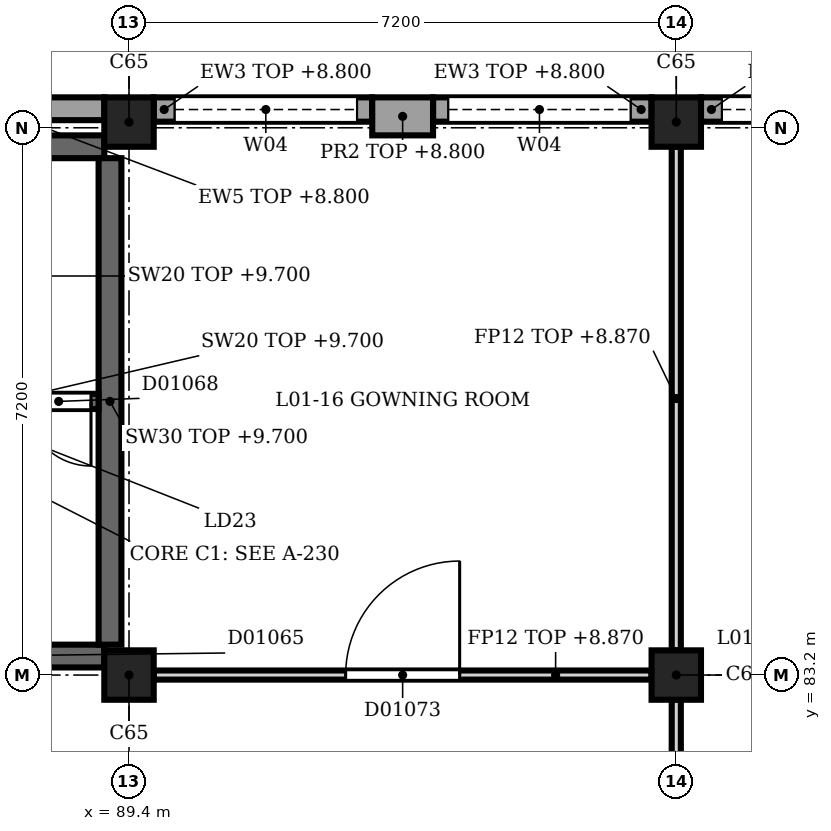
"""IFC4 building model, lengths in metres.
Left out: names, types, materials, properties, quantities, classifications, styles, units other than length and angle.
Written with IfcOpenShell. Run it as: python <this file> out.ifc"""

import sys

from ifc_helpers import new_model, si_unit, direction, frame, frame_2d, origin, origin_2d, place, context, subcontext, project, spatial, rectangle, extrude, element, fill, save


model = new_model("IFC4")
c1 = context("Model", 3, precision=1e-05, world=origin(), true_north=direction((0.0, 1.0)))
c2 = subcontext(c1, "Body", "Model", "MODEL_VIEW")
j1 = project(units=[si_unit("LENGTHUNIT", "METRE"), si_unit("PLANEANGLEUNIT", "RADIAN")], contexts=[c1])
p1 = place(None, origin())
s1 = spatial("IfcSite", under=j1, at=p1, CompositionType="ELEMENT")
p2 = place(p1, origin())
s2 = spatial("IfcBuilding", under=s1, at=p2, CompositionType="ELEMENT")
p3 = place(p2, frame((0.0, 0.0, 5.4)))
s3 = spatial("IfcBuildingStorey", under=s2, at=p3, CompositionType="ELEMENT", Elevation=5.4)
for number, where, z_axis, x_axis in (
    (1, (89.4, 83.2, 0.0), (0.0, 0.0, 1.0), (1.0, 0.0, 0.0)),
    (2, (89.4, 90.475, 0.0), (0.0, 0.0, 1.0), (1.0, 0.0, 0.0)),
    (3, (96.6, 83.2, 0.0), (0.0, 0.0, 1.0), (1.0, 0.0, 0.0)),
    (4, (96.6, 90.475, 0.0), (0.0, 0.0, 1.0), (1.0, 0.0, 0.0)),
):
    element("IfcColumn", number, at=place(p3, frame(where, z_axis=z_axis, x_axis=x_axis)), inside=s3, PredefinedType="COLUMN", context=c2, shape_type="SweptSolid", body=[
        extrude(rectangle(XDim=0.65, YDim=0.65, at=origin_2d()), origin(), (0.0, 0.0, 1.0), 4.5),
    ])
p4 = place(p3, frame((92.6, 90.55, 0.0), z_axis=(0.0, 0.0, 1.0), x_axis=(1.0, 0.0, 0.0)))
e5 = element("IfcWall", 5, at=p4, inside=s3, PredefinedType="SOLIDWALL", context=c2, shape_type="SweptSolid", body=[
    extrude(rectangle(XDim=0.8, YDim=0.5, at=frame_2d((0.4, 0.0))), origin(), (0.0, 0.0, 1.0), 3.4),
])
p5 = place(p3, frame((86.2, 90.65, 0.0), z_axis=(0.0, 0.0, 1.0), x_axis=(1.0, 0.0, 0.0)))
e6 = element("IfcWall", 6, at=p5, inside=s3, PredefinedType="SOLIDWALL", context=c2, shape_type="SweptSolid", body=[
    extrude(rectangle(XDim=2.875, YDim=0.3, at=frame_2d((1.438, 0.0))), origin(), (0.0, 0.0, 1.0), 3.4),
])
p6 = place(p3, frame((89.725, 90.64, 0.0), z_axis=(0.0, 0.0, 1.0), x_axis=(1.0, 0.0, 0.0)))
e7 = element("IfcWall", 7, at=p6, inside=s3, PredefinedType="SOLIDWALL", context=c2, shape_type="SweptSolid", body=[
    extrude(rectangle(XDim=2.875, YDim=0.32, at=frame_2d((1.438, 0.0))), origin(), (0.0, 0.0, 1.0), 3.4),
])
p7 = place(p6, frame((0.275, 0.0, 1.9)))
e8 = element("IfcOpeningElement", 8, at=p7, cuts=e7, PredefinedType="OPENING", context=c2, shape_type="SweptSolid", body=[
    extrude(rectangle(XDim=2.4, YDim=1.2, at=frame_2d((1.2, 0.6))), frame((0.0, 0.17, 0.0), z_axis=(0.0, -1.0, 0.0), x_axis=(1.0, 0.0, 0.0)), (0.0, 0.0, 1.0), 0.34),
])
p8 = place(p3, frame((93.4, 90.64, 0.0), z_axis=(0.0, 0.0, 1.0), x_axis=(1.0, 0.0, 0.0)))
e9 = element("IfcWall", 9, at=p8, inside=s3, PredefinedType="SOLIDWALL", context=c2, shape_type="SweptSolid", body=[
    extrude(rectangle(XDim=2.875, YDim=0.32, at=frame_2d((1.438, 0.0))), origin(), (0.0, 0.0, 1.0), 3.4),
])
p9 = place(p8, frame((0.2, 0.0, 1.9)))
e10 = element("IfcOpeningElement", 10, at=p9, cuts=e9, PredefinedType="OPENING", context=c2, shape_type="SweptSolid", body=[
    extrude(rectangle(XDim=2.4, YDim=1.2, at=frame_2d((1.2, 0.6))), frame((0.0, 0.17, 0.0), z_axis=(0.0, -1.0, 0.0), x_axis=(1.0, 0.0, 0.0)), (0.0, 0.0, 1.0), 0.34),
])
p10 = place(p3, frame((96.925, 90.64, 0.0), z_axis=(0.0, 0.0, 1.0), x_axis=(1.0, 0.0, 0.0)))
e11 = element("IfcWall", 11, at=p10, inside=s3, PredefinedType="SOLIDWALL", context=c2, shape_type="SweptSolid", body=[
    extrude(rectangle(XDim=2.875, YDim=0.32, at=frame_2d((1.438, 0.0))), origin(), (0.0, 0.0, 1.0), 3.4),
])
p11 = place(p10, frame((0.275, 0.0, 1.9)))
e12 = element("IfcOpeningElement", 12, at=p11, cuts=e11, PredefinedType="OPENING", context=c2, shape_type="SweptSolid", body=[
    extrude(rectangle(XDim=2.4, YDim=1.2, at=frame_2d((1.2, 0.6))), frame((0.0, 0.17, 0.0), z_axis=(0.0, -1.0, 0.0), x_axis=(1.0, 0.0, 0.0)), (0.0, 0.0, 1.0), 0.34),
])
p12 = place(p3, frame((82.55, 83.45, 0.0), z_axis=(0.0, 0.0, 1.0), x_axis=(1.0, 0.0, 0.0)))
e13 = element("IfcWall", 13, at=p12, inside=s3, PredefinedType="SHEAR", context=c2, shape_type="SweptSolid", body=[
    extrude(rectangle(XDim=6.525, YDim=0.3, at=frame_2d((3.262, 0.0))), origin(), (0.0, 0.0, 1.0), 4.3),
])
p13 = place(p12, frame((4.25, 0.0, 0.0)))
e14 = element("IfcOpeningElement", 14, at=p13, cuts=e13, PredefinedType="OPENING", context=c2, shape_type="SweptSolid", body=[
    extrude(rectangle(XDim=1.2, YDim=2.1, at=frame_2d((0.6, 1.05))), frame((0.0, 0.16, 0.0), z_axis=(0.0, -1.0, 0.0), x_axis=(1.0, 0.0, 0.0)), (0.0, 0.0, 1.0), 0.32),
])
p14 = place(p3, frame((82.55, 90.15, 0.0), z_axis=(0.0, 0.0, 1.0), x_axis=(1.0, 0.0, 0.0)))
e15 = element("IfcWall", 15, at=p14, inside=s3, PredefinedType="SHEAR", context=c2, shape_type="SweptSolid", body=[
    extrude(rectangle(XDim=6.525, YDim=0.3, at=frame_2d((3.262, 0.0))), origin(), (0.0, 0.0, 1.0), 4.3),
])
p15 = place(p14, frame((1.15, 0.0, 1.2)))
e16 = element("IfcOpeningElement", 16, at=p15, cuts=e15, PredefinedType="OPENING", context=c2, shape_type="SweptSolid", body=[
    extrude(rectangle(XDim=0.6, YDim=1.8, at=frame_2d((0.3, 0.9))), frame((0.0, 0.16, 0.0), z_axis=(0.0, -1.0, 0.0), x_axis=(1.0, 0.0, 0.0)), (0.0, 0.0, 1.0), 0.32),
])
p16 = place(p3, frame((89.15, 83.6, 0.0), z_axis=(0.0, 0.0, 1.0), x_axis=(0.0, 1.0, 0.0)))
e17 = element("IfcWall", 17, at=p16, inside=s3, PredefinedType="SHEAR", context=c2, shape_type="SweptSolid", body=[
    extrude(rectangle(XDim=6.4, YDim=0.3, at=frame_2d((3.2, 0.0))), origin(), (0.0, 0.0, 1.0), 4.3),
])
p17 = place(p3, frame((89.0, 86.8, 0.0), z_axis=(0.0, 0.0, 1.0), x_axis=(-1.0, 0.0, 0.0)))
e18 = element("IfcWall", 18, at=p17, inside=s3, PredefinedType="SHEAR", context=c2, shape_type="SweptSolid", body=[
    extrude(rectangle(XDim=3.25, YDim=0.2, at=frame_2d((1.625, 0.0))), origin(), (0.0, 0.0, 1.0), 4.3),
])
p18 = place(p17, frame((1.55, 0.0, 0.0)))
e19 = element("IfcOpeningElement", 19, at=p18, cuts=e18, PredefinedType="OPENING", context=c2, shape_type="SweptSolid", body=[
    extrude(rectangle(XDim=1.4, YDim=2.1, at=frame_2d((0.7, 1.05))), frame((0.0, 0.11, 0.0), z_axis=(0.0, -1.0, 0.0), x_axis=(1.0, 0.0, 0.0)), (0.0, 0.0, 1.0), 0.22),
])
p19 = place(p17, frame((0.1, 0.0, 0.0)))
e20 = element("IfcOpeningElement", 20, at=p19, cuts=e18, PredefinedType="OPENING", context=c2, shape_type="SweptSolid", body=[
    extrude(rectangle(XDim=0.85, YDim=2.1, at=frame_2d((0.425, 1.05))), frame((0.0, 0.11, 0.0), z_axis=(0.0, -1.0, 0.0), x_axis=(1.0, 0.0, 0.0)), (0.0, 0.0, 1.0), 0.22),
])
p20 = place(p3, frame((89.725, 83.2, 0.0), z_axis=(0.0, 0.0, 1.0), x_axis=(1.0, 0.0, 0.0)))
e21 = element("IfcWall", 21, at=p20, inside=s3, PredefinedType="PARTITIONING", context=c2, shape_type="SweptSolid", body=[
    extrude(rectangle(XDim=6.55, YDim=0.12, at=frame_2d((3.275, 0.0))), origin(), (0.0, 0.0, 1.0), 3.47),
])
p21 = place(p20, frame((2.525, 0.0, 0.0)))
e22 = element("IfcOpeningElement", 22, at=p21, cuts=e21, PredefinedType="OPENING", context=c2, shape_type="SweptSolid", body=[
    extrude(rectangle(XDim=1.5, YDim=2.1, at=frame_2d((0.75, 1.05))), frame((0.0, 0.07, 0.0), z_axis=(0.0, -1.0, 0.0), x_axis=(1.0, 0.0, 0.0)), (0.0, 0.0, 1.0), 0.14),
])
p22 = place(p3, frame((96.6, 82.875, 0.0), z_axis=(0.0, 0.0, 1.0), x_axis=(0.0, -1.0, 0.0)))
e23 = element("IfcWall", 23, at=p22, inside=s3, PredefinedType="PARTITIONING", context=c2, shape_type="SweptSolid", body=[
    extrude(rectangle(XDim=6.55, YDim=0.12, at=frame_2d((3.275, 0.0))), origin(), (0.0, 0.0, 1.0), 3.47),
])
p23 = place(p22, frame((2.525, 0.0, 0.0)))
e24 = element("IfcOpeningElement", 24, at=p23, cuts=e23, PredefinedType="OPENING", context=c2, shape_type="SweptSolid", body=[
    extrude(rectangle(XDim=1.5, YDim=2.2, at=frame_2d((0.75, 1.1))), frame((0.0, 0.07, 0.0), z_axis=(0.0, -1.0, 0.0), x_axis=(1.0, 0.0, 0.0)), (0.0, 0.0, 1.0), 0.14),
])
p24 = place(p3, frame((96.6, 83.525, 0.0), z_axis=(0.0, 0.0, 1.0), x_axis=(0.0, 1.0, 0.0)))
e25 = element("IfcWall", 25, at=p24, inside=s3, PredefinedType="PARTITIONING", context=c2, shape_type="SweptSolid", body=[
    extrude(rectangle(XDim=6.625, YDim=0.12, at=frame_2d((3.312, 0.0))), origin(), (0.0, 0.0, 1.0), 3.47),
])
p25 = place(p7, origin())
e26 = element("IfcWindow", 26, at=p25, inside=s3, PartitioningType="SINGLE_PANEL", PredefinedType="WINDOW", context=c2, shape_type="SweptSolid", body=[
    extrude(rectangle(XDim=2.4, YDim=1.2, at=frame_2d((1.2, 0.6))), frame((0.0, 0.03, 0.0), z_axis=(0.0, -1.0, 0.0), x_axis=(1.0, 0.0, 0.0)), (0.0, 0.0, 1.0), 0.06),
])
fill(e8, e26)
p26 = place(p9, origin())
e27 = element("IfcWindow", 27, at=p26, inside=s3, PartitioningType="SINGLE_PANEL", PredefinedType="WINDOW", context=c2, shape_type="SweptSolid", body=[
    extrude(rectangle(XDim=2.4, YDim=1.2, at=frame_2d((1.2, 0.6))), frame((0.0, 0.03, 0.0), z_axis=(0.0, -1.0, 0.0), x_axis=(1.0, 0.0, 0.0)), (0.0, 0.0, 1.0), 0.06),
])
fill(e10, e27)
p27 = place(p11, origin())
e28 = element("IfcWindow", 28, at=p27, inside=s3, PartitioningType="SINGLE_PANEL", PredefinedType="WINDOW", context=c2, shape_type="SweptSolid", body=[
    extrude(rectangle(XDim=2.4, YDim=1.2, at=frame_2d((1.2, 0.6))), frame((0.0, 0.03, 0.0), z_axis=(0.0, -1.0, 0.0), x_axis=(1.0, 0.0, 0.0)), (0.0, 0.0, 1.0), 0.06),
])
fill(e12, e28)
p28 = place(p19, origin())
e29 = element("IfcDoor", 29, at=p28, inside=s3, OperationType="SINGLE_SWING_LEFT", PredefinedType="DOOR", context=c2, shape_type="SweptSolid", body=[
    extrude(rectangle(XDim=0.85, YDim=2.1, at=frame_2d((0.425, 1.05))), frame((0.0, 0.025, 0.0), z_axis=(0.0, -1.0, 0.0), x_axis=(1.0, 0.0, 0.0)), (0.0, 0.0, 1.0), 0.05),
])
fill(e20, e29)
p29 = place(p21, origin())
e30 = element("IfcDoor", 30, at=p29, inside=s3, OperationType="SINGLE_SWING_LEFT", PredefinedType="DOOR", context=c2, shape_type="SweptSolid", body=[
    extrude(rectangle(XDim=1.5, YDim=2.1, at=frame_2d((0.75, 1.05))), frame((0.0, 0.025, 0.0), z_axis=(0.0, -1.0, 0.0), x_axis=(1.0, 0.0, 0.0)), (0.0, 0.0, 1.0), 0.05),
])
fill(e22, e30)
save(model, sys.argv[1])
